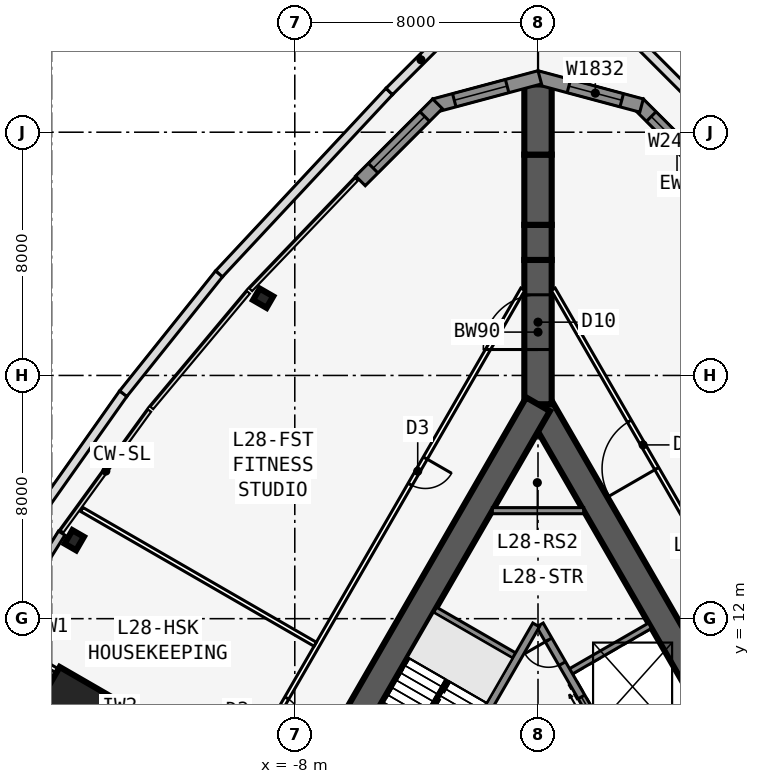
"""IFC4 building model, lengths in metres.
Left out: names, types, materials, properties, quantities, classifications, styles, units other than length and angle.
Written with IfcOpenShell. Run it as: python <this file> out.ifc"""

import sys

from ifc_helpers import new_model, si_unit, direction, frame, frame_2d, origin, origin_2d, place, context, subcontext, project, spatial, polyline, rectangle, i_section, outline, extrude, element, fill, save


model = new_model("IFC4")
c1 = context("Model", 3, precision=1e-05, world=origin(), true_north=direction((0.0, 1.0)))
c2 = subcontext(c1, "Body", "Model", "MODEL_VIEW")
j1 = project(units=[si_unit("LENGTHUNIT", "METRE"), si_unit("PLANEANGLEUNIT", "RADIAN")], contexts=[c1])
p1 = place(None, origin())
s1 = spatial("IfcSite", under=j1, at=p1, CompositionType="ELEMENT")
p2 = place(p1, origin())
s2 = spatial("IfcBuilding", under=s1, at=p2, CompositionType="ELEMENT")
p3 = place(p2, frame((0.0, 0.0, 109.7)))
s3 = spatial("IfcBuildingStorey", under=s2, at=p3, CompositionType="ELEMENT", Elevation=109.7)
p4 = place(p3, frame((16.5, -9.526, 0.0), z_axis=(0.0, 0.0, 1.0), x_axis=(-0.499999749417, 0.866025548458, 0.0)))
e1 = element("IfcWall", 1, at=p4, inside=s3, PredefinedType="SHEAR", context=c2, shape_type="SweptSolid", body=[
    extrude(rectangle(XDim=33.0, YDim=0.9, at=frame_2d((16.5, 0.0))), origin(), (0.0, 0.0, 1.0), 5.0),
])
p5 = place(p4, frame((14.15, 0.0, 0.0)))
e2 = element("IfcOpeningElement", 2, at=p5, cuts=e1, PredefinedType="OPENING", context=c2, shape_type="SweptSolid", body=[
    extrude(rectangle(XDim=1.8, YDim=2.13, at=frame_2d((0.9, 1.065))), frame((0.0, 0.46, 0.0), z_axis=(0.0, -1.0, 0.0), x_axis=(1.0, 0.0, 0.0)), (0.0, 0.0, 1.0), 0.92),
])
p6 = place(p4, frame((12.6, 0.0, 0.0)))
e3 = element("IfcOpeningElement", 3, at=p6, cuts=e1, PredefinedType="OPENING", context=c2, shape_type="SweptSolid", body=[
    extrude(rectangle(XDim=1.0, YDim=2.13, at=frame_2d((0.5, 1.065))), frame((0.0, 0.46, 0.0), z_axis=(0.0, -1.0, 0.0), x_axis=(1.0, 0.0, 0.0)), (0.0, 0.0, 1.0), 0.92),
])
p7 = place(p3, frame((5.379, 2.586, 0.0), z_axis=(0.0, 0.0, 1.0), x_axis=(-0.500001375892, 0.866024609411, 0.0)))
e4 = element("IfcWall", 4, at=p7, inside=s3, PredefinedType="SOLIDWALL", context=c2, shape_type="SweptSolid", body=[
    extrude(rectangle(XDim=10.633, YDim=0.25, at=frame_2d((5.316, 0.0))), origin(), (0.0, 0.0, 1.0), 4.835),
])
p8 = place(p7, frame((9.164, 0.0, 0.0)))
e5 = element("IfcOpeningElement", 5, at=p8, cuts=e4, PredefinedType="OPENING", context=c2, shape_type="SweptSolid", body=[
    extrude(rectangle(XDim=0.9, YDim=2.13, at=frame_2d((0.45, 1.065))), frame((0.0, 0.135, 0.0), z_axis=(0.0, -1.0, 0.0), x_axis=(1.0, 0.0, 0.0)), (0.0, 0.0, 1.0), 0.27),
])
p9 = place(p7, frame((1.0, 0.0, 0.0)))
e6 = element("IfcOpeningElement", 6, at=p9, cuts=e4, PredefinedType="OPENING", context=c2, shape_type="SweptSolid", body=[
    extrude(rectangle(XDim=1.1, YDim=2.13, at=frame_2d((0.55, 1.065))), frame((0.0, 0.135, 0.0), z_axis=(0.0, -1.0, 0.0), x_axis=(1.0, 0.0, 0.0)), (0.0, 0.0, 1.0), 0.27),
])
p10 = place(p7, frame((3.9, 0.0, 0.0)))
e7 = element("IfcOpeningElement", 7, at=p10, cuts=e4, PredefinedType="OPENING", context=c2, shape_type="SweptSolid", body=[
    extrude(rectangle(XDim=1.1, YDim=2.13, at=frame_2d((0.55, 1.065))), frame((0.0, 0.135, 0.0), z_axis=(0.0, -1.0, 0.0), x_axis=(1.0, 0.0, 0.0)), (0.0, 0.0, 1.0), 0.27),
])
p11 = place(p7, frame((6.8, 0.0, 0.0)))
e8 = element("IfcOpeningElement", 8, at=p11, cuts=e4, PredefinedType="OPENING", context=c2, shape_type="SweptSolid", body=[
    extrude(rectangle(XDim=1.1, YDim=2.13, at=frame_2d((0.55, 1.065))), frame((0.0, 0.135, 0.0), z_axis=(0.0, -1.0, 0.0), x_axis=(1.0, 0.0, 0.0)), (0.0, 0.0, 1.0), 0.27),
])
for number, where, z_axis, x_axis in (
    (9, (2.429, 7.696, 0.0), (0.0, 0.0, 1.0), (0.866, 0.5, 0.0)),
    (10, (0.979, 10.207, 0.0), (0.0, 0.0, 1.0), (0.866, 0.5, 0.0)),
):
    element("IfcWall", number, at=place(p3, frame(where, z_axis=z_axis, x_axis=x_axis)), inside=s3, PredefinedType="SOLIDWALL", context=c2, shape_type="SweptSolid", body=[
        extrude(rectangle(XDim=3.125, YDim=0.2, at=frame_2d((1.562, 0.0))), origin(), (0.0, 0.0, 1.0), 4.835),
    ])
p12 = place(p3, frame((0.0, 19.052, 0.0), z_axis=(0.0, 0.0, 1.0), x_axis=(-0.499999749417, -0.866025548458, 0.0)))
e11 = element("IfcWall", 11, at=p12, inside=s3, PredefinedType="SHEAR", context=c2, shape_type="SweptSolid", body=[
    extrude(rectangle(XDim=33.0, YDim=0.9, at=frame_2d((16.5, 0.0))), origin(), (0.0, 0.0, 1.0), 5.0),
])
p13 = place(p12, frame((14.15, 0.0, 0.0)))
e12 = element("IfcOpeningElement", 12, at=p13, cuts=e11, PredefinedType="OPENING", context=c2, shape_type="SweptSolid", body=[
    extrude(rectangle(XDim=1.8, YDim=2.13, at=frame_2d((0.9, 1.065))), frame((0.0, 0.46, 0.0), z_axis=(0.0, -1.0, 0.0), x_axis=(1.0, 0.0, 0.0)), (0.0, 0.0, 1.0), 0.92),
])
p14 = place(p12, frame((12.6, 0.0, 0.0)))
e13 = element("IfcOpeningElement", 13, at=p14, cuts=e11, PredefinedType="OPENING", context=c2, shape_type="SweptSolid", body=[
    extrude(rectangle(XDim=1.0, YDim=2.13, at=frame_2d((0.5, 1.065))), frame((0.0, 0.46, 0.0), z_axis=(0.0, -1.0, 0.0), x_axis=(1.0, 0.0, 0.0)), (0.0, 0.0, 1.0), 0.92),
])
p15 = place(p3, frame((-0.062, 11.794, 0.0), z_axis=(0.0, 0.0, 1.0), x_axis=(-0.500006680225, -0.86602154692, 0.0)))
e14 = element("IfcWall", 14, at=p15, inside=s3, PredefinedType="SOLIDWALL", context=c2, shape_type="SweptSolid", body=[
    extrude(rectangle(XDim=7.733, YDim=0.25, at=frame_2d((3.866, 0.0))), origin(), (0.0, 0.0, 1.0), 4.835),
])
p16 = place(p3, frame((-0.679, 10.727, 0.0), z_axis=(0.0, 0.0, 1.0), x_axis=(-0.866022959057, 0.500004234368, 0.0)))
e15 = element("IfcWall", 15, at=p16, inside=s3, PredefinedType="SOLIDWALL", context=c2, shape_type="SweptSolid", body=[
    extrude(rectangle(XDim=3.125, YDim=0.2, at=frame_2d((1.562, 0.0))), origin(), (0.0, 0.0, 1.0), 4.835),
])
p17 = place(p3, frame((0.0, 19.052, 0.0), z_axis=(0.0, 0.0, 1.0), x_axis=(0.0, 1.0, 0.0)))
e16 = element("IfcWall", 16, at=p17, inside=s3, PredefinedType="SHEAR", context=c2, shape_type="SweptSolid", body=[
    extrude(rectangle(XDim=4.746, YDim=0.9, at=frame_2d((2.373, 0.0))), origin(), (0.0, 0.0, 1.0), 5.0),
])
p18 = place(p17, frame((1.8, 0.0, 0.0)))
e17 = element("IfcOpeningElement", 17, at=p18, cuts=e16, PredefinedType="OPENING", context=c2, shape_type="SweptSolid", body=[
    extrude(rectangle(XDim=1.8, YDim=2.13, at=frame_2d((0.9, 1.065))), frame((0.0, 0.46, 0.0), z_axis=(0.0, -1.0, 0.0), x_axis=(1.0, 0.0, 0.0)), (0.0, 0.0, 1.0), 0.92),
])
p19 = place(p3, frame((0.0, 23.799, 0.0), z_axis=(0.0, 0.0, 1.0), x_axis=(0.0, 1.0, 0.0)))
e18 = element("IfcWall", 18, at=p19, inside=s3, PredefinedType="SHEAR", context=c2, shape_type="SweptSolid", body=[
    extrude(rectangle(XDim=1.155, YDim=0.9, at=frame_2d((0.577, 0.0))), origin(), (0.0, 0.0, 1.0), 5.0),
])
p20 = place(p3, frame((0.0, 24.953, 0.0), z_axis=(0.0, 0.0, 1.0), x_axis=(0.0, 1.0, 0.0)))
e19 = element("IfcWall", 19, at=p20, inside=s3, PredefinedType="SHEAR", context=c2, shape_type="SweptSolid", body=[
    extrude(rectangle(XDim=2.309, YDim=0.9, at=frame_2d((1.155, 0.0))), origin(), (0.0, 0.0, 1.0), 5.0),
])
p21 = place(p3, frame((0.0, 27.263, 0.0), z_axis=(0.0, 0.0, 1.0), x_axis=(0.0, 1.0, 0.0)))
e20 = element("IfcWall", 20, at=p21, inside=s3, PredefinedType="SHEAR", context=c2, shape_type="SweptSolid", body=[
    extrude(rectangle(XDim=2.31, YDim=0.9, at=frame_2d((1.155, 0.0))), origin(), (0.0, 0.0, 1.0), 5.0),
])
for number, where, z_axis, x_axis in (
    (21, (-9.041, 22.541, 0.0), (0.0, 0.0, 1.0), (-0.5, -0.866, 0.0)),
    (22, (-15.254, 14.58, 0.0), (0.0, 0.0, 1.0), (-0.866, 0.5, 0.0)),
):
    element("IfcColumn", number, at=place(p3, frame(where, z_axis=z_axis, x_axis=x_axis)), inside=s3, PredefinedType="COLUMN", context=c2, shape_type="SweptSolid", body=[
        extrude(i_section(OverallWidth=0.437, OverallDepth=0.513, WebThickness=0.061, FlangeThickness=0.097, at=origin_2d()), origin(), (0.0, 0.0, 1.0), 5.0),
    ])
p22 = place(p3, frame((-15.312, 8.84, 0.0), z_axis=(0.0, 0.0, 1.0), x_axis=(-0.866025403784, 0.5, 0.0)))
e23 = element("IfcColumn", 23, at=p22, inside=s3, PredefinedType="COLUMN", context=c2, shape_type="SweptSolid", body=[
    extrude(rectangle(XDim=2.3, YDim=2.3, at=origin_2d()), origin(), (0.0, 0.0, 1.0), 5.0),
])
p23 = place(p3, frame((5.841, 26.399, 0.0), z_axis=(0.0, 0.0, 1.0), x_axis=(-0.707106781187, 0.707106781187, 0.0)))
e24 = element("IfcWall", 24, at=p23, inside=s3, PredefinedType="SOLIDWALL", context=c2, shape_type="SweptSolid", body=[
    extrude(rectangle(XDim=3.586, YDim=0.45, at=frame_2d((1.793, 0.0))), origin(), (0.0, 0.0, 1.0), 4.835),
])
p24 = place(p23, frame((0.593, 0.0, 0.6)))
e25 = element("IfcOpeningElement", 25, at=p24, cuts=e24, PredefinedType="OPENING", context=c2, shape_type="SweptSolid", body=[
    extrude(rectangle(XDim=2.4, YDim=3.2, at=frame_2d((1.2, 1.6))), frame((0.0, 0.235, 0.0), z_axis=(0.0, -1.0, 0.0), x_axis=(1.0, 0.0, 0.0)), (0.0, 0.0, 1.0), 0.47),
])
p25 = place(p3, frame((3.406, 28.877, 0.0), z_axis=(0.0, 0.0, 1.0), x_axis=(-0.965924653531, 0.258823421857, 0.0)))
e26 = element("IfcWall", 26, at=p25, inside=s3, PredefinedType="SOLIDWALL", context=c2, shape_type="SweptSolid", body=[
    extrude(outline(polyline([(3.586, 0.225), (3.527, 0.225), (3.035, 0.093), (3.0, 0.225), (0.0, 0.225), (0.0, -0.225), (3.586, -0.225), (3.586, 0.225)])), origin(), (0.0, 0.0, 1.0), 4.835),
])
p26 = place(p25, frame((0.674, 0.0, 0.6)))
e27 = element("IfcOpeningElement", 27, at=p26, cuts=e26, PredefinedType="OPENING", context=c2, shape_type="SweptSolid", body=[
    extrude(rectangle(XDim=1.8, YDim=3.2, at=frame_2d((0.9, 1.6))), frame((0.0, 0.235, 0.0), z_axis=(0.0, -1.0, 0.0), x_axis=(1.0, 0.0, 0.0)), (0.0, 0.0, 1.0), 0.47),
])
p27 = place(p3, frame((0.058, 29.805, 0.0), z_axis=(0.0, 0.0, 1.0), x_axis=(-0.965924653531, -0.258823421857, 0.0)))
e28 = element("IfcWall", 28, at=p27, inside=s3, PredefinedType="SOLIDWALL", context=c2, shape_type="SweptSolid", body=[
    extrude(outline(polyline([(3.586, 0.225), (0.586, 0.225), (0.551, 0.093), (0.06, 0.225), (0.0, 0.225), (0.0, -0.225), (3.586, -0.225), (3.586, 0.225)])), origin(), (0.0, 0.0, 1.0), 4.835),
])
p28 = place(p27, frame((1.111, 0.0, 0.6)))
e29 = element("IfcOpeningElement", 29, at=p28, cuts=e28, PredefinedType="OPENING", context=c2, shape_type="SweptSolid", body=[
    extrude(rectangle(XDim=1.8, YDim=3.2, at=frame_2d((0.9, 1.6))), frame((0.0, 0.235, 0.0), z_axis=(0.0, -1.0, 0.0), x_axis=(1.0, 0.0, 0.0)), (0.0, 0.0, 1.0), 0.47),
])
p29 = place(p3, frame((-3.305, 28.935, 0.0), z_axis=(0.0, 0.0, 1.0), x_axis=(-0.707106781187, -0.707106781187, 0.0)))
e30 = element("IfcWall", 30, at=p29, inside=s3, PredefinedType="SOLIDWALL", context=c2, shape_type="SweptSolid", body=[
    extrude(rectangle(XDim=3.586, YDim=0.45, at=frame_2d((1.793, 0.0))), origin(), (0.0, 0.0, 1.0), 4.835),
])
p30 = place(p29, frame((0.593, 0.0, 0.6)))
e31 = element("IfcOpeningElement", 31, at=p30, cuts=e30, PredefinedType="OPENING", context=c2, shape_type="SweptSolid", body=[
    extrude(rectangle(XDim=2.4, YDim=3.2, at=frame_2d((1.2, 1.6))), frame((0.0, 0.235, 0.0), z_axis=(0.0, -1.0, 0.0), x_axis=(1.0, 0.0, 0.0)), (0.0, 0.0, 1.0), 0.47),
])
p31 = place(p3, frame((-15.667, 14.814, 0.0), z_axis=(0.0, 0.0, 1.0), x_axis=(-0.529990167382, -0.84800378683, 0.0)))
e32 = element("IfcWall", 32, at=p31, inside=s3, PredefinedType="STANDARD", context=c2, shape_type="SweptSolid", body=[
    extrude(rectangle(XDim=5.003, YDim=0.25, at=frame_2d((2.501, 0.0))), origin(), (0.0, 0.0, 1.0), 4.835),
])
p32 = place(p31, frame((1.618, 0.0, 0.0)))
e33 = element("IfcOpeningElement", 33, at=p32, cuts=e32, PredefinedType="OPENING", context=c2, shape_type="SweptSolid", body=[
    extrude(rectangle(XDim=0.9, YDim=2.13, at=frame_2d((0.45, 1.065))), frame((0.0, 0.135, 0.0), z_axis=(0.0, -1.0, 0.0), x_axis=(1.0, 0.0, 0.0)), (0.0, 0.0, 1.0), 0.27),
])
p33 = place(p3, frame((-16.531, 15.308, 0.0), z_axis=(0.0, 0.0, 1.0), x_axis=(0.576639207024, 0.816998913661, 0.0)))
e34 = element("IfcWall", 34, at=p33, inside=s3, PredefinedType="PARAPET", context=c2, shape_type="SweptSolid", body=[
    extrude(rectangle(XDim=5.012, YDim=0.3, at=frame_2d((2.506, 0.0))), origin(), (0.0, 0.0, 1.0), 1.1),
])
p34 = place(p3, frame((-13.642, 19.402, 0.0), z_axis=(0.0, 0.0, 1.0), x_axis=(0.624606561164, 0.780939590334, 0.0)))
e35 = element("IfcWall", 35, at=p34, inside=s3, PredefinedType="PARAPET", context=c2, shape_type="SweptSolid", body=[
    extrude(rectangle(XDim=5.047, YDim=0.3, at=frame_2d((2.524, 0.0))), origin(), (0.0, 0.0, 1.0), 1.1),
])
p35 = place(p3, frame((-10.489, 23.344, 0.0), z_axis=(0.0, 0.0, 1.0), x_axis=(0.682295981494, 0.731076051883, 0.0)))
e36 = element("IfcWall", 36, at=p35, inside=s3, PredefinedType="PARAPET", context=c2, shape_type="SweptSolid", body=[
    extrude(rectangle(XDim=8.203, YDim=0.3, at=frame_2d((4.102, 0.0))), origin(), (0.0, 0.0, 1.0), 1.1),
])
for number, where, z_axis, x_axis in (
    (37, (-4.892, 29.341, 0.0), (0.0, 0.0, 1.0), (0.707, 0.707, 0.0)),
    (38, (2.809, 31.424, 0.0), (0.0, 0.0, 1.0), (0.707, -0.707, 0.0)),
):
    element("IfcWall", number, at=place(p3, frame(where, z_axis=z_axis, x_axis=x_axis)), inside=s3, PredefinedType="PARAPET", context=c2, shape_type="SweptSolid", body=[
        extrude(rectangle(XDim=2.946, YDim=0.3, at=frame_2d((1.473, 0.0))), origin(), (0.0, 0.0, 1.0), 1.1),
    ])
p36 = place(p3, frame((20.027, -10.985, 0.0), z_axis=(0.0, 0.0, 1.0), x_axis=(-0.500001677587, 0.866024435227, 0.0)))
e39 = element("IfcWall", 39, at=p36, inside=s3, PredefinedType="PARTITIONING", context=c2, shape_type="SweptSolid", body=[
    extrude(rectangle(XDim=39.054, YDim=0.15, at=frame_2d((19.527, 0.0))), origin(), (0.0, 0.0, 1.0), 4.835),
])
p37 = place(p36, frame((6.513, 0.0, 0.0)))
e40 = element("IfcOpeningElement", 40, at=p37, cuts=e39, PredefinedType="OPENING", context=c2, shape_type="SweptSolid", body=[
    extrude(rectangle(XDim=1.8, YDim=2.13, at=frame_2d((0.9, 1.065))), frame((0.0, 0.085, 0.0), z_axis=(0.0, -1.0, 0.0), x_axis=(1.0, 0.0, 0.0)), (0.0, 0.0, 1.0), 0.17),
])
p38 = place(p36, frame((16.527, 0.0, 0.0)))
e41 = element("IfcOpeningElement", 41, at=p38, cuts=e39, PredefinedType="OPENING", context=c2, shape_type="SweptSolid", body=[
    extrude(rectangle(XDim=1.0, YDim=2.13, at=frame_2d((0.5, 1.065))), frame((0.0, 0.085, 0.0), z_axis=(0.0, -1.0, 0.0), x_axis=(1.0, 0.0, 0.0)), (0.0, 0.0, 1.0), 0.17),
])
p39 = place(p36, frame((21.527, 0.0, 0.0)))
e42 = element("IfcOpeningElement", 42, at=p39, cuts=e39, PredefinedType="OPENING", context=c2, shape_type="SweptSolid", body=[
    extrude(rectangle(XDim=1.0, YDim=2.13, at=frame_2d((0.5, 1.065))), frame((0.0, 0.085, 0.0), z_axis=(0.0, -1.0, 0.0), x_axis=(1.0, 0.0, 0.0)), (0.0, 0.0, 1.0), 0.17),
])
p40 = place(p36, frame((25.527, 0.0, 0.0)))
e43 = element("IfcOpeningElement", 43, at=p40, cuts=e39, PredefinedType="OPENING", context=c2, shape_type="SweptSolid", body=[
    extrude(rectangle(XDim=1.0, YDim=2.13, at=frame_2d((0.5, 1.065))), frame((0.0, 0.085, 0.0), z_axis=(0.0, -1.0, 0.0), x_axis=(1.0, 0.0, 0.0)), (0.0, 0.0, 1.0), 0.17),
])
p41 = place(p36, frame((32.24, 0.0, 0.0)))
e44 = element("IfcOpeningElement", 44, at=p41, cuts=e39, PredefinedType="OPENING", context=c2, shape_type="SweptSolid", body=[
    extrude(rectangle(XDim=1.8, YDim=2.13, at=frame_2d((0.9, 1.065))), frame((0.0, 0.085, 0.0), z_axis=(0.0, -1.0, 0.0), x_axis=(1.0, 0.0, 0.0)), (0.0, 0.0, 1.0), 0.17),
])
p42 = place(p3, frame((-0.5, 22.836, 0.0), z_axis=(0.0, 0.0, 1.0), x_axis=(-0.500001677587, -0.866024435227, 0.0)))
e45 = element("IfcWall", 45, at=p42, inside=s3, PredefinedType="PARTITIONING", context=c2, shape_type="SweptSolid", body=[
    extrude(rectangle(XDim=39.054, YDim=0.15, at=frame_2d((19.527, 0.0))), origin(), (0.0, 0.0, 1.0), 4.835),
])
p43 = place(p42, frame((6.414, 0.0, 0.0)))
e46 = element("IfcOpeningElement", 46, at=p43, cuts=e45, PredefinedType="OPENING", context=c2, shape_type="SweptSolid", body=[
    extrude(rectangle(XDim=1.0, YDim=2.13, at=frame_2d((0.5, 1.065))), frame((0.0, 0.085, 0.0), z_axis=(0.0, -1.0, 0.0), x_axis=(1.0, 0.0, 0.0)), (0.0, 0.0, 1.0), 0.17),
])
p44 = place(p42, frame((15.527, 0.0, 0.0)))
e47 = element("IfcOpeningElement", 47, at=p44, cuts=e45, PredefinedType="OPENING", context=c2, shape_type="SweptSolid", body=[
    extrude(rectangle(XDim=1.0, YDim=2.13, at=frame_2d((0.5, 1.065))), frame((0.0, 0.085, 0.0), z_axis=(0.0, -1.0, 0.0), x_axis=(1.0, 0.0, 0.0)), (0.0, 0.0, 1.0), 0.17),
])
p45 = place(p42, frame((21.277, 0.0, 0.0)))
e48 = element("IfcOpeningElement", 48, at=p45, cuts=e45, PredefinedType="OPENING", context=c2, shape_type="SweptSolid", body=[
    extrude(rectangle(XDim=1.0, YDim=2.13, at=frame_2d((0.5, 1.065))), frame((0.0, 0.085, 0.0), z_axis=(0.0, -1.0, 0.0), x_axis=(1.0, 0.0, 0.0)), (0.0, 0.0, 1.0), 0.17),
])
p46 = place(p42, frame((31.39, 0.0, 0.0)))
e49 = element("IfcOpeningElement", 49, at=p46, cuts=e45, PredefinedType="OPENING", context=c2, shape_type="SweptSolid", body=[
    extrude(rectangle(XDim=1.0, YDim=2.13, at=frame_2d((0.5, 1.065))), frame((0.0, 0.085, 0.0), z_axis=(0.0, -1.0, 0.0), x_axis=(1.0, 0.0, 0.0)), (0.0, 0.0, 1.0), 0.17),
])
p47 = place(p3, frame((-7.329, 11.159, 0.0), z_axis=(0.0, 0.0, 1.0), x_axis=(-0.866024615734, 0.50000136494, 0.0)))
e50 = element("IfcWall", 50, at=p47, inside=s3, PredefinedType="PARTITIONING", context=c2, shape_type="SweptSolid", body=[
    extrude(rectangle(XDim=8.865, YDim=0.15, at=frame_2d((4.433, 0.0))), origin(), (0.0, 0.0, 1.0), 4.835),
])
p48 = place(p3, frame((-9.829, 6.829, 0.0), z_axis=(0.0, 0.0, 1.0), x_axis=(-0.86601827145, 0.500012353362, 0.0)))
e51 = element("IfcWall", 51, at=p48, inside=s3, PredefinedType="PARTITIONING", context=c2, shape_type="SweptSolid", body=[
    extrude(rectangle(XDim=9.064, YDim=0.15, at=frame_2d((4.532, 0.0))), origin(), (0.0, 0.0, 1.0), 4.835),
])
p49 = place(p3, frame((-1.501, 15.552, 0.0), z_axis=(0.0, 0.0, 1.0), x_axis=(1.0, 0.0, 0.0)))
e52 = element("IfcWall", 52, at=p49, inside=s3, PredefinedType="SOLIDWALL", context=c2, shape_type="SweptSolid", body=[
    extrude(rectangle(XDim=3.002, YDim=0.2, at=frame_2d((1.501, 0.0))), origin(), (0.0, 0.0, 1.0), 4.835),
])
p50 = place(p3, frame((-2.988, 9.978, 0.0), z_axis=(0.0, 0.0, 1.0), x_axis=(-0.499992232847, -0.866029888106, 0.0)))
e53 = element("IfcWall", 53, at=p50, inside=s3, PredefinedType="SOLIDWALL", context=c2, shape_type="SweptSolid", body=[
    extrude(rectangle(XDim=2.794, YDim=0.1, at=frame_2d((1.397, 0.0))), origin(), (0.0, 0.0, 1.0), 5.0),
])
p51 = place(p24, origin())
e54 = element("IfcWindow", 54, at=p51, inside=s3, PartitioningType="SINGLE_PANEL", PredefinedType="WINDOW", context=c2, shape_type="SweptSolid", body=[
    extrude(rectangle(XDim=2.4, YDim=3.2, at=frame_2d((1.2, 1.6))), frame((0.0, 0.03, 0.0), z_axis=(0.0, -1.0, 0.0), x_axis=(1.0, 0.0, 0.0)), (0.0, 0.0, 1.0), 0.06),
])
fill(e25, e54)
p52 = place(p26, origin())
e55 = element("IfcWindow", 55, at=p52, inside=s3, PartitioningType="SINGLE_PANEL", PredefinedType="WINDOW", context=c2, shape_type="SweptSolid", body=[
    extrude(rectangle(XDim=1.8, YDim=3.2, at=frame_2d((0.9, 1.6))), frame((0.0, 0.03, 0.0), z_axis=(0.0, -1.0, 0.0), x_axis=(1.0, 0.0, 0.0)), (0.0, 0.0, 1.0), 0.06),
])
fill(e27, e55)
p53 = place(p28, origin())
e56 = element("IfcWindow", 56, at=p53, inside=s3, PartitioningType="SINGLE_PANEL", PredefinedType="WINDOW", context=c2, shape_type="SweptSolid", body=[
    extrude(rectangle(XDim=1.8, YDim=3.2, at=frame_2d((0.9, 1.6))), frame((0.0, 0.03, 0.0), z_axis=(0.0, -1.0, 0.0), x_axis=(1.0, 0.0, 0.0)), (0.0, 0.0, 1.0), 0.06),
])
fill(e29, e56)
p54 = place(p30, origin())
e57 = element("IfcWindow", 57, at=p54, inside=s3, PartitioningType="SINGLE_PANEL", PredefinedType="WINDOW", context=c2, shape_type="SweptSolid", body=[
    extrude(rectangle(XDim=2.4, YDim=3.2, at=frame_2d((1.2, 1.6))), frame((0.0, 0.03, 0.0), z_axis=(0.0, -1.0, 0.0), x_axis=(1.0, 0.0, 0.0)), (0.0, 0.0, 1.0), 0.06),
])
fill(e31, e57)
p55 = place(p41, origin())
e58 = element("IfcDoor", 58, at=p55, inside=s3, OperationType="DOUBLE_DOOR_SINGLE_SWING", PredefinedType="DOOR", context=c2, shape_type="SweptSolid", body=[
    extrude(rectangle(XDim=1.8, YDim=2.13, at=frame_2d((0.9, 1.065))), frame((0.0, 0.025, 0.0), z_axis=(0.0, -1.0, 0.0), x_axis=(1.0, 0.0, 0.0)), (0.0, 0.0, 1.0), 0.05),
])
fill(e44, e58)
p56 = place(p43, origin())
e59 = element("IfcDoor", 59, at=p56, inside=s3, OperationType="SINGLE_SWING_LEFT", PredefinedType="DOOR", context=c2, shape_type="SweptSolid", body=[
    extrude(rectangle(XDim=1.0, YDim=2.13, at=frame_2d((0.5, 1.065))), frame((0.0, 0.025, 0.0), z_axis=(0.0, -1.0, 0.0), x_axis=(1.0, 0.0, 0.0)), (0.0, 0.0, 1.0), 0.05),
])
fill(e46, e59)
p57 = place(p44, origin())
e60 = element("IfcDoor", 60, at=p57, inside=s3, OperationType="SINGLE_SWING_RIGHT", PredefinedType="DOOR", context=c2, shape_type="SweptSolid", body=[
    extrude(rectangle(XDim=1.0, YDim=2.13, at=frame_2d((0.5, 1.065))), frame((0.0, 0.025, 0.0), z_axis=(0.0, -1.0, 0.0), x_axis=(1.0, 0.0, 0.0)), (0.0, 0.0, 1.0), 0.05),
])
fill(e47, e60)
p58 = place(p18, origin())
e61 = element("IfcDoor", 61, at=p58, inside=s3, OperationType="DOUBLE_DOOR_DOUBLE_SWING", PredefinedType="DOOR", context=c2, shape_type="SweptSolid", body=[
    extrude(rectangle(XDim=1.8, YDim=2.13, at=frame_2d((0.9, 1.065))), frame((0.0, 0.025, 0.0), z_axis=(0.0, -1.0, 0.0), x_axis=(1.0, 0.0, 0.0)), (0.0, 0.0, 1.0), 0.05),
])
fill(e17, e61)
p59 = place(p8, origin())
e62 = element("IfcDoor", 62, at=p59, inside=s3, OperationType="SINGLE_SWING_RIGHT", PredefinedType="DOOR", context=c2, shape_type="SweptSolid", body=[
    extrude(rectangle(XDim=0.9, YDim=2.13, at=frame_2d((0.45, 1.065))), frame((0.0, 0.025, 0.0), z_axis=(0.0, -1.0, 0.0), x_axis=(1.0, 0.0, 0.0)), (0.0, 0.0, 1.0), 0.05),
])
fill(e5, e62)
p60 = place(p11, origin())
e63 = element("IfcDoor", 63, at=p60, inside=s3, OperationType="DOUBLE_DOOR_SLIDING", PredefinedType="USERDEFINED", context=c2, shape_type="SweptSolid", body=[
    extrude(rectangle(XDim=1.1, YDim=2.13, at=frame_2d((0.55, 1.065))), frame((0.0, 0.025, 0.0), z_axis=(0.0, -1.0, 0.0), x_axis=(1.0, 0.0, 0.0)), (0.0, 0.0, 1.0), 0.05),
])
fill(e8, e63)
save(model, sys.argv[1])
